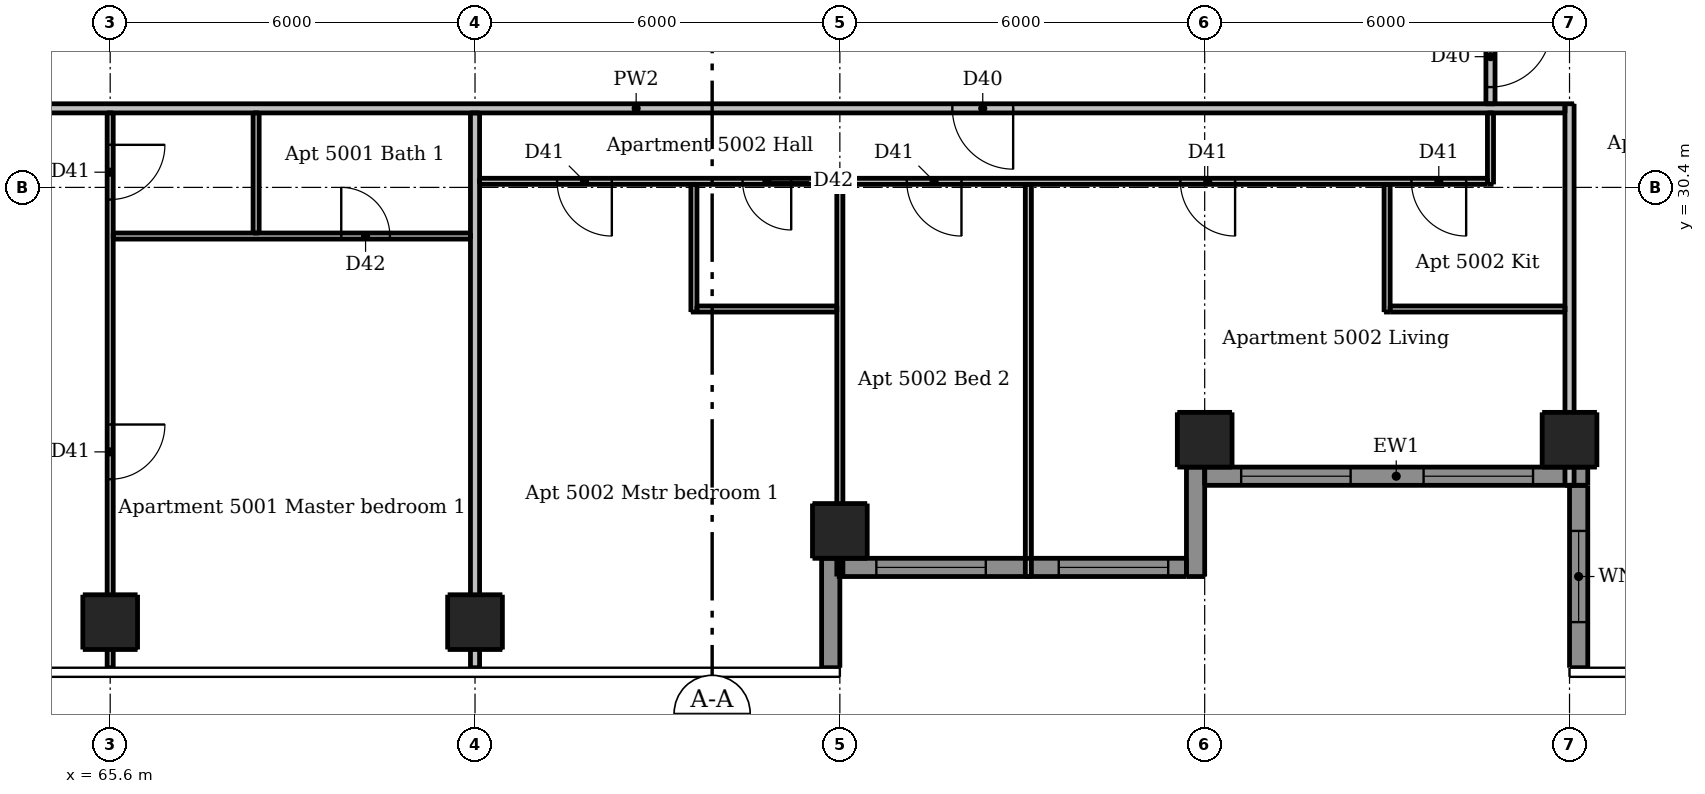
"""IFC4 building model, lengths in metres.
Left out: names, types, materials, properties, quantities, classifications, styles, units other than length and angle.
Written with IfcOpenShell. Run it as: python <this file> out.ifc"""

import sys

from ifc_helpers import new_model, si_unit, direction, frame, frame_2d, origin, origin_2d, place, context, subcontext, project, spatial, rectangle, extrude, element, fill, save


model = new_model("IFC4")
c1 = context("Model", 3, precision=1e-05, world=origin(), true_north=direction((0.0, 1.0)))
c2 = subcontext(c1, "Body", "Model", "MODEL_VIEW")
j1 = project(units=[si_unit("LENGTHUNIT", "METRE"), si_unit("PLANEANGLEUNIT", "RADIAN")], contexts=[c1])
p1 = place(None, origin())
s1 = spatial("IfcSite", under=j1, at=p1, CompositionType="ELEMENT")
p2 = place(p1, origin())
s2 = spatial("IfcBuilding", under=s1, at=p2, CompositionType="ELEMENT")
p3 = place(p2, frame((0.0, 0.0, 190.3)))
s3 = spatial("IfcBuildingStorey", under=s2, at=p3, CompositionType="ELEMENT", Elevation=190.3)
for number, where, z_axis, x_axis in (
    (1, (65.6, 23.25, 0.0), (0.0, 0.0, 1.0), (1.0, 0.0, 0.0)),
    (2, (71.6, 23.25, 0.0), (0.0, 0.0, 1.0), (1.0, 0.0, 0.0)),
    (3, (77.6, 24.75, 0.0), (0.0, 0.0, 1.0), (1.0, 0.0, 0.0)),
    (4, (83.6, 26.25, 0.0), (0.0, 0.0, 1.0), (1.0, 0.0, 0.0)),
    (5, (89.6, 26.25, 0.0), (0.0, 0.0, 1.0), (1.0, 0.0, 0.0)),
):
    element("IfcColumn", number, at=place(p3, frame(where, z_axis=z_axis, x_axis=x_axis)), inside=s3, PredefinedType="COLUMN", context=c2, shape_type="SweptSolid", body=[
        extrude(rectangle(XDim=0.9, YDim=0.9, at=origin_2d()), origin(), (0.0, 0.0, 1.0), 3.05),
    ])
for number, where, z_axis, x_axis in (
    (6, (77.45, 22.5, 0.0), (0.0, 0.0, 1.0), (0.0, 1.0, 0.0)),
    (7, (83.45, 24.0, 0.0), (0.0, 0.0, 1.0), (0.0, 1.0, 0.0)),
):
    element("IfcWall", number, at=place(p3, frame(where, z_axis=z_axis, x_axis=x_axis)), inside=s3, PredefinedType="SOLIDWALL", context=c2, shape_type="SweptSolid", body=[
        extrude(rectangle(XDim=1.8, YDim=0.3, at=frame_2d((0.9, 0.0))), origin(), (0.0, 0.0, 1.0), 3.05),
    ])
p4 = place(p3, frame((89.75, 25.5, 0.0), z_axis=(0.0, 0.0, 1.0), x_axis=(0.0, -1.0, 0.0)))
e8 = element("IfcWall", 8, at=p4, inside=s3, PredefinedType="SOLIDWALL", context=c2, shape_type="SweptSolid", body=[
    extrude(rectangle(XDim=3.0, YDim=0.3, at=frame_2d((1.5, 0.0))), origin(), (0.0, 0.0, 1.0), 3.05),
])
p5 = place(p4, frame((0.75, 0.0, 0.9)))
e9 = element("IfcOpeningElement", 9, at=p5, cuts=e8, PredefinedType="OPENING", context=c2, shape_type="SweptSolid", body=[
    extrude(rectangle(XDim=1.5, YDim=1.5, at=frame_2d((0.75, 0.75))), frame((0.0, 0.16, 0.0), z_axis=(0.0, -1.0, 0.0), x_axis=(1.0, 0.0, 0.0)), (0.0, 0.0, 1.0), 0.32),
])
p6 = place(p3, frame((77.6, 24.15, 0.0), z_axis=(0.0, 0.0, 1.0), x_axis=(1.0, 0.0, 0.0)))
e10 = element("IfcWall", 10, at=p6, inside=s3, PredefinedType="SOLIDWALL", context=c2, shape_type="SweptSolid", body=[
    extrude(rectangle(XDim=5.7, YDim=0.3, at=frame_2d((2.85, 0.0))), origin(), (0.0, 0.0, 1.0), 3.05),
])
p7 = place(p6, frame((0.6, 0.0, 0.15)))
e11 = element("IfcOpeningElement", 11, at=p7, cuts=e10, PredefinedType="OPENING", context=c2, shape_type="SweptSolid", body=[
    extrude(rectangle(XDim=1.8, YDim=2.1, at=frame_2d((0.9, 1.05))), frame((0.0, 0.16, 0.0), z_axis=(0.0, -1.0, 0.0), x_axis=(1.0, 0.0, 0.0)), (0.0, 0.0, 1.0), 0.32),
])
p8 = place(p6, frame((3.6, 0.0, 0.15)))
e12 = element("IfcOpeningElement", 12, at=p8, cuts=e10, PredefinedType="OPENING", context=c2, shape_type="SweptSolid", body=[
    extrude(rectangle(XDim=1.8, YDim=2.1, at=frame_2d((0.9, 1.05))), frame((0.0, 0.16, 0.0), z_axis=(0.0, -1.0, 0.0), x_axis=(1.0, 0.0, 0.0)), (0.0, 0.0, 1.0), 0.32),
])
p9 = place(p3, frame((83.6, 25.65, 0.0), z_axis=(0.0, 0.0, 1.0), x_axis=(1.0, 0.0, 0.0)))
e13 = element("IfcWall", 13, at=p9, inside=s3, PredefinedType="SOLIDWALL", context=c2, shape_type="SweptSolid", body=[
    extrude(rectangle(XDim=6.3, YDim=0.3, at=frame_2d((3.15, 0.0))), origin(), (0.0, 0.0, 1.0), 3.05),
])
p10 = place(p9, frame((0.6, 0.0, 0.15)))
e14 = element("IfcOpeningElement", 14, at=p10, cuts=e13, PredefinedType="OPENING", context=c2, shape_type="SweptSolid", body=[
    extrude(rectangle(XDim=1.8, YDim=2.1, at=frame_2d((0.9, 1.05))), frame((0.0, 0.16, 0.0), z_axis=(0.0, -1.0, 0.0), x_axis=(1.0, 0.0, 0.0)), (0.0, 0.0, 1.0), 0.32),
])
p11 = place(p9, frame((3.6, 0.0, 0.15)))
e15 = element("IfcOpeningElement", 15, at=p11, cuts=e13, PredefinedType="OPENING", context=c2, shape_type="SweptSolid", body=[
    extrude(rectangle(XDim=1.8, YDim=2.1, at=frame_2d((0.9, 1.05))), frame((0.0, 0.16, 0.0), z_axis=(0.0, -1.0, 0.0), x_axis=(1.0, 0.0, 0.0)), (0.0, 0.0, 1.0), 0.32),
])
p12 = place(p3, frame((65.6, 31.625, 0.0), z_axis=(0.0, 0.0, 1.0), x_axis=(0.0, -1.0, 0.0)))
e16 = element("IfcWall", 16, at=p12, inside=s3, PredefinedType="PARTITIONING", context=c2, shape_type="SweptSolid", body=[
    extrude(rectangle(XDim=9.125, YDim=0.1, at=frame_2d((4.562, 0.0))), origin(), (0.0, 0.0, 1.0), 2.516),
])
p13 = place(p12, frame((0.525, 0.0, 0.0)))
e17 = element("IfcOpeningElement", 17, at=p13, cuts=e16, PredefinedType="OPENING", context=c2, shape_type="SweptSolid", body=[
    extrude(rectangle(XDim=0.9, YDim=2.1, at=frame_2d((0.45, 1.05))), frame((0.0, 0.06, 0.0), z_axis=(0.0, -1.0, 0.0), x_axis=(1.0, 0.0, 0.0)), (0.0, 0.0, 1.0), 0.12),
])
p14 = place(p12, frame((5.125, 0.0, 0.0)))
e18 = element("IfcOpeningElement", 18, at=p14, cuts=e16, PredefinedType="OPENING", context=c2, shape_type="SweptSolid", body=[
    extrude(rectangle(XDim=0.9, YDim=2.1, at=frame_2d((0.45, 1.05))), frame((0.0, 0.06, 0.0), z_axis=(0.0, -1.0, 0.0), x_axis=(1.0, 0.0, 0.0)), (0.0, 0.0, 1.0), 0.12),
])
p15 = place(p3, frame((68.0, 29.65, 0.0), z_axis=(0.0, 0.0, 1.0), x_axis=(0.0, 1.0, 0.0)))
e19 = element("IfcWall", 19, at=p15, inside=s3, PredefinedType="PARTITIONING", context=c2, shape_type="SweptSolid", body=[
    extrude(rectangle(XDim=1.975, YDim=0.1, at=frame_2d((0.988, 0.0))), origin(), (0.0, 0.0, 1.0), 3.05),
])
p16 = place(p3, frame((75.2, 28.35, 0.0), z_axis=(0.0, 0.0, 1.0), x_axis=(0.0, 1.0, 0.0)))
e20 = element("IfcWall", 20, at=p16, inside=s3, PredefinedType="PARTITIONING", context=c2, shape_type="SweptSolid", body=[
    extrude(rectangle(XDim=2.1, YDim=0.1, at=frame_2d((1.05, 0.0))), origin(), (0.0, 0.0, 1.0), 3.05),
])
p17 = place(p3, frame((77.6, 24.0, 0.0), z_axis=(0.0, 0.0, 1.0), x_axis=(0.0, 1.0, 0.0)))
e21 = element("IfcWall", 21, at=p17, inside=s3, PredefinedType="PARTITIONING", context=c2, shape_type="SweptSolid", body=[
    extrude(rectangle(XDim=6.45, YDim=0.1, at=frame_2d((3.225, 0.0))), origin(), (0.0, 0.0, 1.0), 2.59),
])
p18 = place(p3, frame((80.7, 24.0, 0.0), z_axis=(0.0, 0.0, 1.0), x_axis=(0.0, 1.0, 0.0)))
e22 = element("IfcWall", 22, at=p18, inside=s3, PredefinedType="PARTITIONING", context=c2, shape_type="SweptSolid", body=[
    extrude(rectangle(XDim=6.45, YDim=0.1, at=frame_2d((3.225, 0.0))), origin(), (0.0, 0.0, 1.0), 3.05),
])
p19 = place(p3, frame((86.6, 28.35, 0.0), z_axis=(0.0, 0.0, 1.0), x_axis=(0.0, 1.0, 0.0)))
e23 = element("IfcWall", 23, at=p19, inside=s3, PredefinedType="PARTITIONING", context=c2, shape_type="SweptSolid", body=[
    extrude(rectangle(XDim=2.1, YDim=0.1, at=frame_2d((1.05, 0.0))), origin(), (0.0, 0.0, 1.0), 3.05),
])
p20 = place(p3, frame((88.3, 30.45, 0.0), z_axis=(0.0, 0.0, 1.0), x_axis=(0.0, 1.0, 0.0)))
e24 = element("IfcWall", 24, at=p20, inside=s3, PredefinedType="PARTITIONING", context=c2, shape_type="SweptSolid", body=[
    extrude(rectangle(XDim=1.175, YDim=0.1, at=frame_2d((0.587, 0.0))), origin(), (0.0, 0.0, 1.0), 3.05),
])
p21 = place(p3, frame((88.25, 30.5, 0.0), z_axis=(0.0, 0.0, 1.0), x_axis=(-1.0, 0.0, 0.0)))
e25 = element("IfcWall", 25, at=p21, inside=s3, PredefinedType="PARTITIONING", context=c2, shape_type="SweptSolid", body=[
    extrude(rectangle(XDim=16.575, YDim=0.1, at=frame_2d((8.288, 0.0))), origin(), (0.0, 0.0, 1.0), 3.05),
])
p22 = place(p21, frame((4.15, 0.0, 0.0)))
e26 = element("IfcOpeningElement", 26, at=p22, cuts=e25, PredefinedType="OPENING", context=c2, shape_type="SweptSolid", body=[
    extrude(rectangle(XDim=0.9, YDim=2.1, at=frame_2d((0.45, 1.05))), frame((0.0, 0.06, 0.0), z_axis=(0.0, -1.0, 0.0), x_axis=(1.0, 0.0, 0.0)), (0.0, 0.0, 1.0), 0.12),
])
p23 = place(p21, frame((0.35, 0.0, 0.0)))
e27 = element("IfcOpeningElement", 27, at=p23, cuts=e25, PredefinedType="OPENING", context=c2, shape_type="SweptSolid", body=[
    extrude(rectangle(XDim=0.9, YDim=2.1, at=frame_2d((0.45, 1.05))), frame((0.0, 0.06, 0.0), z_axis=(0.0, -1.0, 0.0), x_axis=(1.0, 0.0, 0.0)), (0.0, 0.0, 1.0), 0.12),
])
p24 = place(p21, frame((14.4, 0.0, 0.0)))
e28 = element("IfcOpeningElement", 28, at=p24, cuts=e25, PredefinedType="OPENING", context=c2, shape_type="SweptSolid", body=[
    extrude(rectangle(XDim=0.9, YDim=2.1, at=frame_2d((0.45, 1.05))), frame((0.0, 0.06, 0.0), z_axis=(0.0, -1.0, 0.0), x_axis=(1.0, 0.0, 0.0)), (0.0, 0.0, 1.0), 0.12),
])
p25 = place(p21, frame((8.65, 0.0, 0.0)))
e29 = element("IfcOpeningElement", 29, at=p25, cuts=e25, PredefinedType="OPENING", context=c2, shape_type="SweptSolid", body=[
    extrude(rectangle(XDim=0.9, YDim=2.1, at=frame_2d((0.45, 1.05))), frame((0.0, 0.06, 0.0), z_axis=(0.0, -1.0, 0.0), x_axis=(1.0, 0.0, 0.0)), (0.0, 0.0, 1.0), 0.12),
])
p26 = place(p21, frame((11.45, 0.0, 0.0)))
e30 = element("IfcOpeningElement", 30, at=p26, cuts=e25, PredefinedType="OPENING", context=c2, shape_type="SweptSolid", body=[
    extrude(rectangle(XDim=0.8, YDim=2.1, at=frame_2d((0.4, 1.05))), frame((0.0, 0.06, 0.0), z_axis=(0.0, -1.0, 0.0), x_axis=(1.0, 0.0, 0.0)), (0.0, 0.0, 1.0), 0.12),
])
p27 = place(p3, frame((65.65, 29.6, 0.0), z_axis=(0.0, 0.0, 1.0), x_axis=(1.0, 0.0, 0.0)))
e31 = element("IfcWall", 31, at=p27, inside=s3, PredefinedType="PARTITIONING", context=c2, shape_type="SweptSolid", body=[
    extrude(rectangle(XDim=5.875, YDim=0.1, at=frame_2d((2.938, 0.0))), origin(), (0.0, 0.0, 1.0), 3.05),
])
p28 = place(p27, frame((3.75, 0.0, 0.0)))
e32 = element("IfcOpeningElement", 32, at=p28, cuts=e31, PredefinedType="OPENING", context=c2, shape_type="SweptSolid", body=[
    extrude(rectangle(XDim=0.8, YDim=2.1, at=frame_2d((0.4, 1.05))), frame((0.0, 0.06, 0.0), z_axis=(0.0, -1.0, 0.0), x_axis=(1.0, 0.0, 0.0)), (0.0, 0.0, 1.0), 0.12),
])
p29 = place(p3, frame((75.25, 28.4, 0.0), z_axis=(0.0, 0.0, 1.0), x_axis=(1.0, 0.0, 0.0)))
e33 = element("IfcWall", 33, at=p29, inside=s3, PredefinedType="PARTITIONING", context=c2, shape_type="SweptSolid", body=[
    extrude(rectangle(XDim=2.3, YDim=0.1, at=frame_2d((1.15, 0.0))), origin(), (0.0, 0.0, 1.0), 3.05),
])
p30 = place(p3, frame((86.65, 28.4, 0.0), z_axis=(0.0, 0.0, 1.0), x_axis=(1.0, 0.0, 0.0)))
e34 = element("IfcWall", 34, at=p30, inside=s3, PredefinedType="PARTITIONING", context=c2, shape_type="SweptSolid", body=[
    extrude(rectangle(XDim=2.875, YDim=0.1, at=frame_2d((1.438, 0.0))), origin(), (0.0, 0.0, 1.0), 3.05),
])
p31 = place(p3, frame((71.6, 22.5, 0.0), z_axis=(0.0, 0.0, 1.0), x_axis=(0.0, 1.0, 0.0)))
e35 = element("IfcWall", 35, at=p31, inside=s3, PredefinedType="PARTITIONING", context=c2, shape_type="SweptSolid", body=[
    extrude(rectangle(XDim=9.125, YDim=0.15, at=frame_2d((4.562, 0.0))), origin(), (0.0, 0.0, 1.0), 2.516),
])
p32 = place(p3, frame((88.3, 61.175, 0.0), z_axis=(0.0, 0.0, 1.0), x_axis=(0.0, -1.0, 0.0)))
e36 = element("IfcWall", 36, at=p32, inside=s3, PredefinedType="PARTITIONING", context=c2, shape_type="SweptSolid", body=[
    extrude(rectangle(XDim=29.4, YDim=0.15, at=frame_2d((14.7, 0.0))), origin(), (0.0, 0.0, 1.0), 3.05),
])
p33 = place(p32, frame((28.125, 0.0, 0.0)))
e37 = element("IfcOpeningElement", 37, at=p33, cuts=e36, PredefinedType="OPENING", context=c2, shape_type="SweptSolid", body=[
    extrude(rectangle(XDim=1.0, YDim=2.1, at=frame_2d((0.5, 1.05))), frame((0.0, 0.085, 0.0), z_axis=(0.0, -1.0, 0.0), x_axis=(1.0, 0.0, 0.0)), (0.0, 0.0, 1.0), 0.17),
])
p34 = place(p32, frame((10.725, 0.0, 0.0)))
e38 = element("IfcOpeningElement", 38, at=p34, cuts=e36, PredefinedType="OPENING", context=c2, shape_type="SweptSolid", body=[
    extrude(rectangle(XDim=1.0, YDim=2.1, at=frame_2d((0.5, 1.05))), frame((0.0, 0.085, 0.0), z_axis=(0.0, -1.0, 0.0), x_axis=(1.0, 0.0, 0.0)), (0.0, 0.0, 1.0), 0.17),
])
p35 = place(p3, frame((89.6, 25.5, 0.0), z_axis=(0.0, 0.0, 1.0), x_axis=(0.0, 1.0, 0.0)))
e39 = element("IfcWall", 39, at=p35, inside=s3, PredefinedType="PARTITIONING", context=c2, shape_type="SweptSolid", body=[
    extrude(rectangle(XDim=6.275, YDim=0.15, at=frame_2d((3.137, 0.0))), origin(), (0.0, 0.0, 1.0), 2.516),
])
p36 = place(p3, frame((89.525, 31.7, 0.0), z_axis=(0.0, 0.0, 1.0), x_axis=(-1.0, 0.0, 0.0)))
e40 = element("IfcWall", 40, at=p36, inside=s3, PredefinedType="PARTITIONING", context=c2, shape_type="SweptSolid", body=[
    extrude(rectangle(XDim=30.55, YDim=0.15, at=frame_2d((15.275, 0.0))), origin(), (0.0, 0.0, 1.0), 3.05),
])
p37 = place(p36, frame((26.775, 0.0, 0.0)))
e41 = element("IfcOpeningElement", 41, at=p37, cuts=e40, PredefinedType="OPENING", context=c2, shape_type="SweptSolid", body=[
    extrude(rectangle(XDim=1.0, YDim=2.1, at=frame_2d((0.5, 1.05))), frame((0.0, 0.085, 0.0), z_axis=(0.0, -1.0, 0.0), x_axis=(1.0, 0.0, 0.0)), (0.0, 0.0, 1.0), 0.17),
])
p38 = place(p36, frame((9.075, 0.0, 0.0)))
e42 = element("IfcOpeningElement", 42, at=p38, cuts=e40, PredefinedType="OPENING", context=c2, shape_type="SweptSolid", body=[
    extrude(rectangle(XDim=1.0, YDim=2.1, at=frame_2d((0.5, 1.05))), frame((0.0, 0.085, 0.0), z_axis=(0.0, -1.0, 0.0), x_axis=(1.0, 0.0, 0.0)), (0.0, 0.0, 1.0), 0.17),
])
p39 = place(p5, origin())
e43 = element("IfcWindow", 43, at=p39, inside=s3, PartitioningType="DOUBLE_PANEL_VERTICAL", PredefinedType="WINDOW", context=c2, shape_type="SweptSolid", body=[
    extrude(rectangle(XDim=1.5, YDim=1.5, at=frame_2d((0.75, 0.75))), frame((0.0, 0.03, 0.0), z_axis=(0.0, -1.0, 0.0), x_axis=(1.0, 0.0, 0.0)), (0.0, 0.0, 1.0), 0.06),
])
fill(e9, e43)
p40 = place(p7, origin())
e44 = element("IfcWindow", 44, at=p40, inside=s3, PartitioningType="DOUBLE_PANEL_VERTICAL", PredefinedType="WINDOW", context=c2, shape_type="SweptSolid", body=[
    extrude(rectangle(XDim=1.8, YDim=2.1, at=frame_2d((0.9, 1.05))), frame((0.0, 0.03, 0.0), z_axis=(0.0, -1.0, 0.0), x_axis=(1.0, 0.0, 0.0)), (0.0, 0.0, 1.0), 0.06),
])
fill(e11, e44)
p41 = place(p8, origin())
e45 = element("IfcWindow", 45, at=p41, inside=s3, PartitioningType="DOUBLE_PANEL_VERTICAL", PredefinedType="WINDOW", context=c2, shape_type="SweptSolid", body=[
    extrude(rectangle(XDim=1.8, YDim=2.1, at=frame_2d((0.9, 1.05))), frame((0.0, 0.03, 0.0), z_axis=(0.0, -1.0, 0.0), x_axis=(1.0, 0.0, 0.0)), (0.0, 0.0, 1.0), 0.06),
])
fill(e12, e45)
p42 = place(p10, origin())
e46 = element("IfcWindow", 46, at=p42, inside=s3, PartitioningType="DOUBLE_PANEL_VERTICAL", PredefinedType="WINDOW", context=c2, shape_type="SweptSolid", body=[
    extrude(rectangle(XDim=1.8, YDim=2.1, at=frame_2d((0.9, 1.05))), frame((0.0, 0.03, 0.0), z_axis=(0.0, -1.0, 0.0), x_axis=(1.0, 0.0, 0.0)), (0.0, 0.0, 1.0), 0.06),
])
fill(e14, e46)
p43 = place(p11, origin())
e47 = element("IfcWindow", 47, at=p43, inside=s3, PartitioningType="DOUBLE_PANEL_VERTICAL", PredefinedType="WINDOW", context=c2, shape_type="SweptSolid", body=[
    extrude(rectangle(XDim=1.8, YDim=2.1, at=frame_2d((0.9, 1.05))), frame((0.0, 0.03, 0.0), z_axis=(0.0, -1.0, 0.0), x_axis=(1.0, 0.0, 0.0)), (0.0, 0.0, 1.0), 0.06),
])
fill(e15, e47)
p44 = place(p13, origin())
e48 = element("IfcDoor", 48, at=p44, inside=s3, OperationType="SINGLE_SWING_LEFT", PredefinedType="DOOR", context=c2, shape_type="SweptSolid", body=[
    extrude(rectangle(XDim=0.9, YDim=2.1, at=frame_2d((0.45, 1.05))), frame((0.0, 0.025, 0.0), z_axis=(0.0, -1.0, 0.0), x_axis=(1.0, 0.0, 0.0)), (0.0, 0.0, 1.0), 0.05),
])
fill(e17, e48)
p45 = place(p14, origin())
e49 = element("IfcDoor", 49, at=p45, inside=s3, OperationType="SINGLE_SWING_LEFT", PredefinedType="DOOR", context=c2, shape_type="SweptSolid", body=[
    extrude(rectangle(XDim=0.9, YDim=2.1, at=frame_2d((0.45, 1.05))), frame((0.0, 0.025, 0.0), z_axis=(0.0, -1.0, 0.0), x_axis=(1.0, 0.0, 0.0)), (0.0, 0.0, 1.0), 0.05),
])
fill(e18, e49)
p46 = place(p28, origin())
e50 = element("IfcDoor", 50, at=p46, inside=s3, OperationType="SINGLE_SWING_LEFT", PredefinedType="DOOR", context=c2, shape_type="SweptSolid", body=[
    extrude(rectangle(XDim=0.8, YDim=2.1, at=frame_2d((0.4, 1.05))), frame((0.0, 0.025, 0.0), z_axis=(0.0, -1.0, 0.0), x_axis=(1.0, 0.0, 0.0)), (0.0, 0.0, 1.0), 0.05),
])
fill(e32, e50)
p47 = place(p38, origin())
e51 = element("IfcDoor", 51, at=p47, inside=s3, OperationType="SINGLE_SWING_LEFT", PredefinedType="DOOR", context=c2, shape_type="SweptSolid", body=[
    extrude(rectangle(XDim=1.0, YDim=2.1, at=frame_2d((0.5, 1.05))), frame((0.0, 0.025, 0.0), z_axis=(0.0, -1.0, 0.0), x_axis=(1.0, 0.0, 0.0)), (0.0, 0.0, 1.0), 0.05),
])
fill(e42, e51)
p48 = place(p22, origin())
e52 = element("IfcDoor", 52, at=p48, inside=s3, OperationType="SINGLE_SWING_LEFT", PredefinedType="DOOR", context=c2, shape_type="SweptSolid", body=[
    extrude(rectangle(XDim=0.9, YDim=2.1, at=frame_2d((0.45, 1.05))), frame((0.0, 0.025, 0.0), z_axis=(0.0, -1.0, 0.0), x_axis=(1.0, 0.0, 0.0)), (0.0, 0.0, 1.0), 0.05),
])
fill(e26, e52)
p49 = place(p23, origin())
e53 = element("IfcDoor", 53, at=p49, inside=s3, OperationType="SINGLE_SWING_LEFT", PredefinedType="DOOR", context=c2, shape_type="SweptSolid", body=[
    extrude(rectangle(XDim=0.9, YDim=2.1, at=frame_2d((0.45, 1.05))), frame((0.0, 0.025, 0.0), z_axis=(0.0, -1.0, 0.0), x_axis=(1.0, 0.0, 0.0)), (0.0, 0.0, 1.0), 0.05),
])
fill(e27, e53)
p50 = place(p24, origin())
e54 = element("IfcDoor", 54, at=p50, inside=s3, OperationType="SINGLE_SWING_LEFT", PredefinedType="DOOR", context=c2, shape_type="SweptSolid", body=[
    extrude(rectangle(XDim=0.9, YDim=2.1, at=frame_2d((0.45, 1.05))), frame((0.0, 0.025, 0.0), z_axis=(0.0, -1.0, 0.0), x_axis=(1.0, 0.0, 0.0)), (0.0, 0.0, 1.0), 0.05),
])
fill(e28, e54)
p51 = place(p25, origin())
e55 = element("IfcDoor", 55, at=p51, inside=s3, OperationType="SINGLE_SWING_LEFT", PredefinedType="DOOR", context=c2, shape_type="SweptSolid", body=[
    extrude(rectangle(XDim=0.9, YDim=2.1, at=frame_2d((0.45, 1.05))), frame((0.0, 0.025, 0.0), z_axis=(0.0, -1.0, 0.0), x_axis=(1.0, 0.0, 0.0)), (0.0, 0.0, 1.0), 0.05),
])
fill(e29, e55)
p52 = place(p26, origin())
e56 = element("IfcDoor", 56, at=p52, inside=s3, OperationType="SINGLE_SWING_LEFT", PredefinedType="DOOR", context=c2, shape_type="SweptSolid", body=[
    extrude(rectangle(XDim=0.8, YDim=2.1, at=frame_2d((0.4, 1.05))), frame((0.0, 0.025, 0.0), z_axis=(0.0, -1.0, 0.0), x_axis=(1.0, 0.0, 0.0)), (0.0, 0.0, 1.0), 0.05),
])
fill(e30, e56)
p53 = place(p33, origin())
e57 = element("IfcDoor", 57, at=p53, inside=s3, OperationType="SINGLE_SWING_LEFT", PredefinedType="DOOR", context=c2, shape_type="SweptSolid", body=[
    extrude(rectangle(XDim=1.0, YDim=2.1, at=frame_2d((0.5, 1.05))), frame((0.0, 0.025, 0.0), z_axis=(0.0, -1.0, 0.0), x_axis=(1.0, 0.0, 0.0)), (0.0, 0.0, 1.0), 0.05),
])
fill(e37, e57)
save(model, sys.argv[1])
